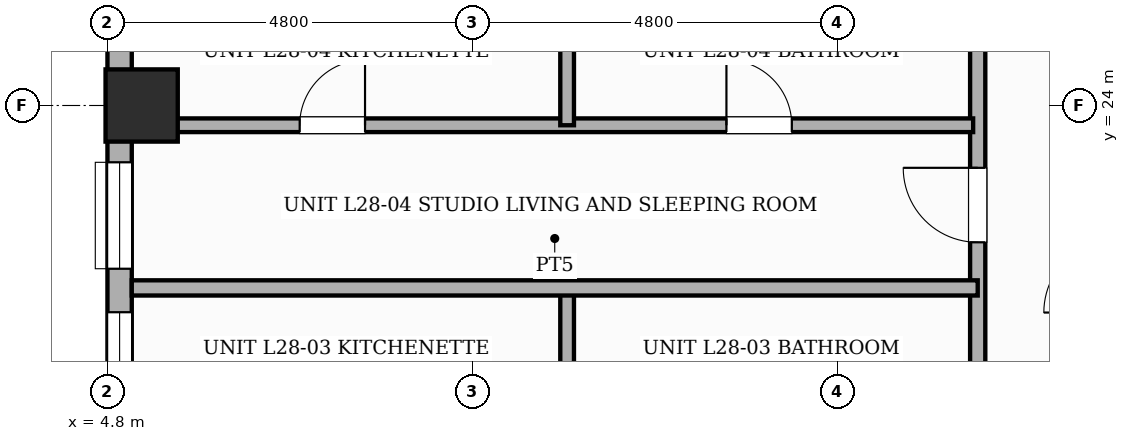
"""IFC4 building model, lengths in metres.
Left out: names, types, materials, properties, quantities, classifications, styles, units other than length and angle.
Written with IfcOpenShell. Run it as: python <this file> out.ifc"""

import sys

from ifc_helpers import new_model, si_unit, direction, frame, frame_2d, origin, origin_2d, place, context, subcontext, project, spatial, rectangle, extrude, element, fill, save


model = new_model("IFC4")
c1 = context("Model", 3, precision=1e-05, world=origin(), true_north=direction((0.0, 1.0)))
c2 = subcontext(c1, "Body", "Model", "MODEL_VIEW")
j1 = project(units=[si_unit("LENGTHUNIT", "METRE"), si_unit("PLANEANGLEUNIT", "RADIAN")], contexts=[c1])
p1 = place(None, origin())
s1 = spatial("IfcSite", under=j1, at=p1, CompositionType="ELEMENT")
p2 = place(p1, origin())
s2 = spatial("IfcBuilding", under=s1, at=p2, CompositionType="ELEMENT")
p3 = place(p2, frame((0.0, 0.0, 110.8)))
s3 = spatial("IfcBuildingStorey", under=s2, at=p3, CompositionType="ELEMENT", Elevation=110.8)
p4 = place(p3, frame((5.25, 24.0, 0.0), z_axis=(0.0, 0.0, 1.0), x_axis=(1.0, 0.0, 0.0)))
e1 = element("IfcColumn", 1, at=p4, inside=s3, PredefinedType="COLUMN", context=c2, shape_type="SweptSolid", body=[
    extrude(rectangle(XDim=0.95, YDim=0.95, at=origin_2d()), origin(), (0.0, 0.0, 1.0), 3.6),
])
p5 = place(p3, frame((4.96, 12.0, 0.0), z_axis=(0.0, 0.0, 1.0), x_axis=(0.0, 1.0, 0.0)))
e2 = element("IfcWall", 2, at=p5, inside=s3, PredefinedType="STANDARD", context=c2, shape_type="SweptSolid", body=[
    extrude(rectangle(XDim=33.6, YDim=0.32, at=frame_2d((16.8, 0.0))), origin(), (0.0, 0.0, 1.0), 2.54),
])
p6 = place(p5, frame((4.25, 0.0, 0.0)))
e3 = element("IfcOpeningElement", 3, at=p6, cuts=e2, PredefinedType="OPENING", context=c2, shape_type="SweptSolid", body=[
    extrude(rectangle(XDim=1.1, YDim=2.15, at=frame_2d((0.55, 1.075))), frame((0.0, 0.17, 0.0), z_axis=(0.0, -1.0, 0.0), x_axis=(1.0, 0.0, 0.0)), (0.0, 0.0, 1.0), 0.34),
])
p7 = place(p5, frame((3.153, 0.0, 0.45)))
e4 = element("IfcOpeningElement", 4, at=p7, cuts=e2, PredefinedType="OPENING", context=c2, shape_type="SweptSolid", body=[
    extrude(rectangle(XDim=0.6, YDim=1.8, at=frame_2d((0.3, 0.9))), frame((0.0, 0.17, 0.0), z_axis=(0.0, -1.0, 0.0), x_axis=(1.0, 0.0, 0.0)), (0.0, 0.0, 1.0), 0.34),
])
p8 = place(p5, frame((5.853, 0.0, 0.45)))
e5 = element("IfcOpeningElement", 5, at=p8, cuts=e2, PredefinedType="OPENING", context=c2, shape_type="SweptSolid", body=[
    extrude(rectangle(XDim=0.6, YDim=1.8, at=frame_2d((0.3, 0.9))), frame((0.0, 0.17, 0.0), z_axis=(0.0, -1.0, 0.0), x_axis=(1.0, 0.0, 0.0)), (0.0, 0.0, 1.0), 0.34),
])
p9 = place(p5, frame((9.853, 0.0, 0.65)))
e6 = element("IfcOpeningElement", 6, at=p9, cuts=e2, PredefinedType="OPENING", context=c2, shape_type="SweptSolid", body=[
    extrude(rectangle(XDim=1.4, YDim=1.1, at=frame_2d((0.7, 0.55))), frame((0.0, 0.17, 0.0), z_axis=(0.0, -1.0, 0.0), x_axis=(1.0, 0.0, 0.0)), (0.0, 0.0, 1.0), 0.34),
])
p10 = place(p5, frame((0.355, 0.0, 0.45)))
e7 = element("IfcOpeningElement", 7, at=p10, cuts=e2, PredefinedType="OPENING", context=c2, shape_type="SweptSolid", body=[
    extrude(rectangle(XDim=0.95, YDim=1.8, at=frame_2d((0.475, 0.9))), frame((0.0, 0.17, 0.0), z_axis=(0.0, -1.0, 0.0), x_axis=(1.0, 0.0, 0.0)), (0.0, 0.0, 1.0), 0.34),
])
p11 = place(p5, frame((8.33, 0.0, 0.45)))
e8 = element("IfcOpeningElement", 8, at=p11, cuts=e2, PredefinedType="OPENING", context=c2, shape_type="SweptSolid", body=[
    extrude(rectangle(XDim=0.95, YDim=1.8, at=frame_2d((0.475, 0.9))), frame((0.0, 0.17, 0.0), z_axis=(0.0, -1.0, 0.0), x_axis=(1.0, 0.0, 0.0)), (0.0, 0.0, 1.0), 0.34),
])
p12 = place(p5, frame((12.732, 0.0, 0.45)))
e9 = element("IfcOpeningElement", 9, at=p12, cuts=e2, PredefinedType="OPENING", context=c2, shape_type="SweptSolid", body=[
    extrude(rectangle(XDim=0.75, YDim=1.8, at=frame_2d((0.375, 0.9))), frame((0.0, 0.17, 0.0), z_axis=(0.0, -1.0, 0.0), x_axis=(1.0, 0.0, 0.0)), (0.0, 0.0, 1.0), 0.34),
])
p13 = place(p5, frame((14.558, 0.0, 0.65)))
e10 = element("IfcOpeningElement", 10, at=p13, cuts=e2, PredefinedType="OPENING", context=c2, shape_type="SweptSolid", body=[
    extrude(rectangle(XDim=1.4, YDim=1.1, at=frame_2d((0.7, 0.55))), frame((0.0, 0.17, 0.0), z_axis=(0.0, -1.0, 0.0), x_axis=(1.0, 0.0, 0.0)), (0.0, 0.0, 1.0), 0.34),
])
p14 = place(p3, frame((16.25, 9.92, 0.0), z_axis=(0.0, 0.0, 1.0), x_axis=(0.0, 1.0, 0.0)))
e11 = element("IfcWall", 11, at=p14, inside=s3, PredefinedType="PARTITIONING", context=c2, shape_type="SweptSolid", body=[
    extrude(rectangle(XDim=15.83, YDim=0.2, at=frame_2d((7.915, 0.0))), origin(), (0.0, 0.0, 1.0), 3.36),
])
p15 = place(p14, frame((0.835, 0.0, 0.0)))
e12 = element("IfcOpeningElement", 12, at=p15, cuts=e11, PredefinedType="OPENING", context=c2, shape_type="SweptSolid", body=[
    extrude(rectangle(XDim=0.98, YDim=2.18, at=frame_2d((0.49, 1.09))), frame((0.0, 0.11, 0.0), z_axis=(0.0, -1.0, 0.0), x_axis=(1.0, 0.0, 0.0)), (0.0, 0.0, 1.0), 0.22),
])
p16 = place(p14, frame((4.415, 0.0, 0.0)))
e13 = element("IfcOpeningElement", 13, at=p16, cuts=e11, PredefinedType="OPENING", context=c2, shape_type="SweptSolid", body=[
    extrude(rectangle(XDim=0.98, YDim=2.18, at=frame_2d((0.49, 1.09))), frame((0.0, 0.11, 0.0), z_axis=(0.0, -1.0, 0.0), x_axis=(1.0, 0.0, 0.0)), (0.0, 0.0, 1.0), 0.22),
])
p17 = place(p14, frame((8.415, 0.0, 0.0)))
e14 = element("IfcOpeningElement", 14, at=p17, cuts=e11, PredefinedType="OPENING", context=c2, shape_type="SweptSolid", body=[
    extrude(rectangle(XDim=0.98, YDim=2.18, at=frame_2d((0.49, 1.09))), frame((0.0, 0.11, 0.0), z_axis=(0.0, -1.0, 0.0), x_axis=(1.0, 0.0, 0.0)), (0.0, 0.0, 1.0), 0.22),
])
p18 = place(p14, frame((12.28, 0.0, 0.0)))
e15 = element("IfcOpeningElement", 15, at=p18, cuts=e11, PredefinedType="OPENING", context=c2, shape_type="SweptSolid", body=[
    extrude(rectangle(XDim=0.98, YDim=2.18, at=frame_2d((0.49, 1.09))), frame((0.0, 0.11, 0.0), z_axis=(0.0, -1.0, 0.0), x_axis=(1.0, 0.0, 0.0)), (0.0, 0.0, 1.0), 0.22),
])
p19 = place(p3, frame((10.848, 20.01, 0.0), z_axis=(0.0, 0.0, 1.0), x_axis=(0.0, 1.0, 0.0)))
e16 = element("IfcWall", 16, at=p19, inside=s3, PredefinedType="PLUMBINGWALL", context=c2, shape_type="SweptSolid", body=[
    extrude(rectangle(XDim=1.63, YDim=0.18, at=frame_2d((0.815, 0.0))), origin(), (0.0, 0.0, 1.0), 3.36),
])
p20 = place(p3, frame((5.12, 21.6, 0.0), z_axis=(0.0, 0.0, 1.0), x_axis=(1.0, 0.0, 0.0)))
e17 = element("IfcWall", 17, at=p20, inside=s3, PredefinedType="SOLIDWALL", context=c2, shape_type="SweptSolid", body=[
    extrude(rectangle(XDim=11.13, YDim=0.2, at=frame_2d((5.565, 0.0))), origin(), (0.0, 0.0, 1.0), 3.36),
])
p21 = place(p3, frame((5.12, 23.74, 0.0), z_axis=(0.0, 0.0, 1.0), x_axis=(1.0, 0.0, 0.0)))
e18 = element("IfcWall", 18, at=p21, inside=s3, PredefinedType="PLUMBINGWALL", context=c2, shape_type="SweptSolid", body=[
    extrude(rectangle(XDim=11.07, YDim=0.18, at=frame_2d((5.535, 0.0))), origin(), (0.0, 0.0, 1.0), 2.54),
])
p22 = place(p21, frame((2.209, 0.0, 0.0)))
e19 = element("IfcOpeningElement", 19, at=p22, cuts=e18, PredefinedType="OPENING", context=c2, shape_type="SweptSolid", body=[
    extrude(rectangle(XDim=0.86, YDim=2.1, at=frame_2d((0.43, 1.05))), frame((0.0, 0.1, 0.0), z_axis=(0.0, -1.0, 0.0), x_axis=(1.0, 0.0, 0.0)), (0.0, 0.0, 1.0), 0.2),
])
p23 = place(p21, frame((7.824, 0.0, 0.0)))
e20 = element("IfcOpeningElement", 20, at=p23, cuts=e18, PredefinedType="OPENING", context=c2, shape_type="SweptSolid", body=[
    extrude(rectangle(XDim=0.86, YDim=2.1, at=frame_2d((0.43, 1.05))), frame((0.0, 0.1, 0.0), z_axis=(0.0, -1.0, 0.0), x_axis=(1.0, 0.0, 0.0)), (0.0, 0.0, 1.0), 0.2),
])
p24 = place(p3, frame((10.848, 23.74, 0.0), z_axis=(0.0, 0.0, 1.0), x_axis=(0.0, 1.0, 0.0)))
e21 = element("IfcWall", 21, at=p24, inside=s3, PredefinedType="PLUMBINGWALL", context=c2, shape_type="SweptSolid", body=[
    extrude(rectangle(XDim=1.98, YDim=0.18, at=frame_2d((0.99, 0.0))), origin(), (0.0, 0.0, 1.0), 3.36),
])
p25 = place(p9, origin())
e22 = element("IfcWindow", 22, at=p25, inside=s3, PartitioningType="SINGLE_PANEL", PredefinedType="WINDOW", context=c2, shape_type="SweptSolid", body=[
    extrude(rectangle(XDim=1.4, YDim=1.1, at=frame_2d((0.7, 0.55))), frame((0.0, 0.03, 0.0), z_axis=(0.0, -1.0, 0.0), x_axis=(1.0, 0.0, 0.0)), (0.0, 0.0, 1.0), 0.06),
])
fill(e6, e22)
p26 = place(p11, origin())
e23 = element("IfcWindow", 23, at=p26, inside=s3, PartitioningType="SINGLE_PANEL", PredefinedType="WINDOW", context=c2, shape_type="SweptSolid", body=[
    extrude(rectangle(XDim=0.95, YDim=1.8, at=frame_2d((0.475, 0.9))), frame((0.0, 0.03, 0.0), z_axis=(0.0, -1.0, 0.0), x_axis=(1.0, 0.0, 0.0)), (0.0, 0.0, 1.0), 0.06),
])
fill(e8, e23)
p27 = place(p18, origin())
e24 = element("IfcDoor", 24, at=p27, inside=s3, OperationType="SINGLE_SWING_RIGHT", PredefinedType="DOOR", context=c2, shape_type="SweptSolid", body=[
    extrude(rectangle(XDim=0.98, YDim=2.18, at=frame_2d((0.49, 1.09))), frame((0.0, 0.025, 0.0), z_axis=(0.0, -1.0, 0.0), x_axis=(1.0, 0.0, 0.0)), (0.0, 0.0, 1.0), 0.05),
])
fill(e15, e24)
p28 = place(p22, origin())
e25 = element("IfcDoor", 25, at=p28, inside=s3, OperationType="SINGLE_SWING_RIGHT", PredefinedType="DOOR", context=c2, shape_type="SweptSolid", body=[
    extrude(rectangle(XDim=0.86, YDim=2.1, at=frame_2d((0.43, 1.05))), frame((0.0, 0.025, 0.0), z_axis=(0.0, -1.0, 0.0), x_axis=(1.0, 0.0, 0.0)), (0.0, 0.0, 1.0), 0.05),
])
fill(e19, e25)
p29 = place(p23, origin())
e26 = element("IfcDoor", 26, at=p29, inside=s3, OperationType="SINGLE_SWING_LEFT", PredefinedType="DOOR", context=c2, shape_type="SweptSolid", body=[
    extrude(rectangle(XDim=0.86, YDim=2.1, at=frame_2d((0.43, 1.05))), frame((0.0, 0.025, 0.0), z_axis=(0.0, -1.0, 0.0), x_axis=(1.0, 0.0, 0.0)), (0.0, 0.0, 1.0), 0.05),
])
fill(e20, e26)
save(model, sys.argv[1])
